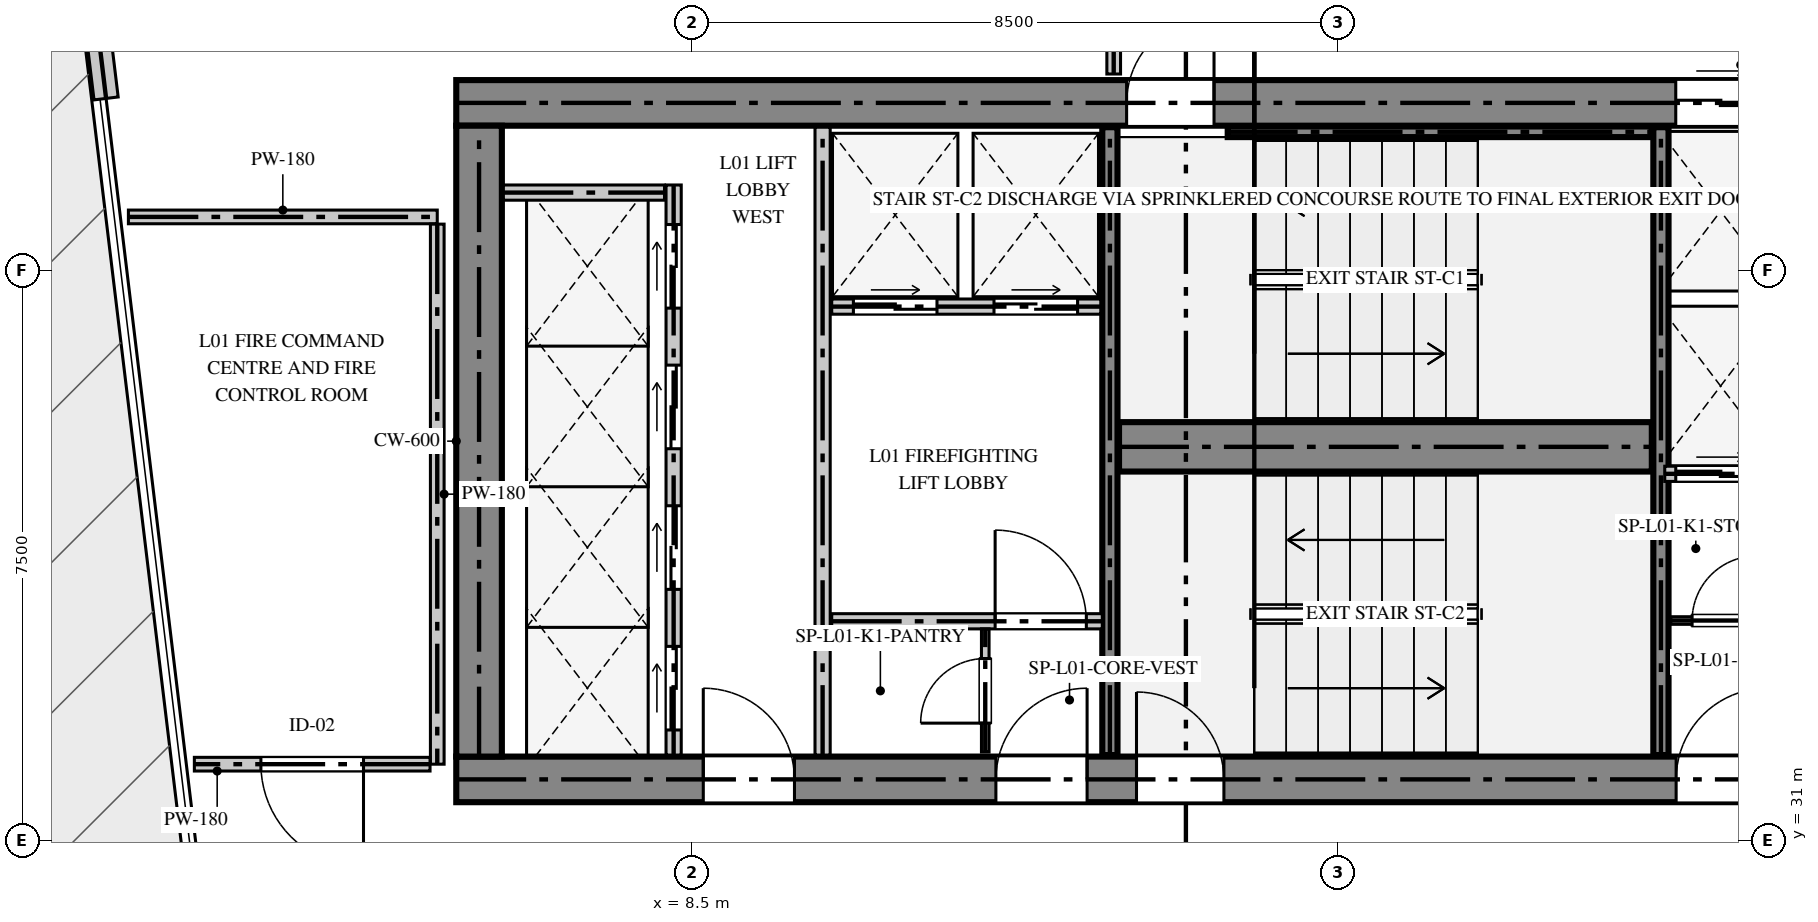
"""IFC4 building model, lengths in metres.
Left out: names, types, materials, properties, quantities, classifications, styles, units other than length and angle.
Written with IfcOpenShell. Run it as: python <this file> out.ifc"""

import sys

from ifc_helpers import new_model, si_unit, direction, frame, frame_2d, origin, place, context, subcontext, project, spatial, rectangle, extrude, element, fill, save


model = new_model("IFC4")
c1 = context("Model", 3, precision=1e-05, world=origin(), true_north=direction((0.0, 1.0)))
c2 = subcontext(c1, "Body", "Model", "MODEL_VIEW")
j1 = project(units=[si_unit("LENGTHUNIT", "METRE"), si_unit("PLANEANGLEUNIT", "RADIAN")], contexts=[c1])
p1 = place(None, origin())
s1 = spatial("IfcSite", under=j1, at=p1, CompositionType="ELEMENT")
p2 = place(p1, origin())
s2 = spatial("IfcBuilding", under=s1, at=p2, CompositionType="ELEMENT")
p3 = place(p2, origin())
s3 = spatial("IfcBuildingStorey", under=s2, at=p3, CompositionType="ELEMENT", Elevation=0.0)
p4 = place(p3, frame((5.4, 40.7, 0.0), z_axis=(0.0, 0.0, 1.0), x_axis=(1.0, 0.0, 0.0)))
e1 = element("IfcWall", 1, at=p4, inside=s3, PredefinedType="SHEAR", context=c2, shape_type="SweptSolid", body=[
    extrude(rectangle(XDim=18.05, YDim=0.6, at=frame_2d((9.025, 0.0))), origin(), (0.0, 0.0, 1.0), 5.4),
])
p5 = place(p4, frame((8.82, 0.0, 0.0)))
e2 = element("IfcOpeningElement", 2, at=p5, cuts=e1, PredefinedType="OPENING", context=c2, shape_type="SweptSolid", body=[
    extrude(rectangle(XDim=1.15, YDim=2.2, at=frame_2d((0.575, 1.1))), frame((0.0, 0.31, 0.0), z_axis=(0.0, -1.0, 0.0), x_axis=(1.0, 0.0, 0.0)), (0.0, 0.0, 1.0), 0.62),
])
p6 = place(p4, frame((16.045, 0.0, 0.0)))
e3 = element("IfcOpeningElement", 3, at=p6, cuts=e1, PredefinedType="OPENING", context=c2, shape_type="SweptSolid", body=[
    extrude(rectangle(XDim=1.18, YDim=2.25, at=frame_2d((0.59, 1.125))), frame((0.0, 0.31, 0.0), z_axis=(0.0, -1.0, 0.0), x_axis=(1.0, 0.0, 0.0)), (0.0, 0.0, 1.0), 0.62),
])
p7 = place(p3, frame((5.4, 31.8, 0.0), z_axis=(0.0, 0.0, 1.0), x_axis=(1.0, 0.0, 0.0)))
e4 = element("IfcWall", 4, at=p7, inside=s3, PredefinedType="SHEAR", context=c2, shape_type="SweptSolid", body=[
    extrude(rectangle(XDim=18.05, YDim=0.6, at=frame_2d((9.025, 0.0))), origin(), (0.0, 0.0, 1.0), 5.4),
])
p8 = place(p7, frame((3.25, 0.0, 0.0)))
e5 = element("IfcOpeningElement", 5, at=p8, cuts=e4, PredefinedType="OPENING", context=c2, shape_type="SweptSolid", body=[
    extrude(rectangle(XDim=1.2, YDim=2.2, at=frame_2d((0.6, 1.1))), frame((0.0, 0.31, 0.0), z_axis=(0.0, -1.0, 0.0), x_axis=(1.0, 0.0, 0.0)), (0.0, 0.0, 1.0), 0.62),
])
p9 = place(p7, frame((7.1, 0.0, 0.0)))
e6 = element("IfcOpeningElement", 6, at=p9, cuts=e4, PredefinedType="OPENING", context=c2, shape_type="SweptSolid", body=[
    extrude(rectangle(XDim=1.2, YDim=2.2, at=frame_2d((0.6, 1.1))), frame((0.0, 0.31, 0.0), z_axis=(0.0, -1.0, 0.0), x_axis=(1.0, 0.0, 0.0)), (0.0, 0.0, 1.0), 0.62),
])
p10 = place(p7, frame((8.95, 0.0, 0.0)))
e7 = element("IfcOpeningElement", 7, at=p10, cuts=e4, PredefinedType="OPENING", context=c2, shape_type="SweptSolid", body=[
    extrude(rectangle(XDim=1.15, YDim=2.2, at=frame_2d((0.575, 1.1))), frame((0.0, 0.31, 0.0), z_axis=(0.0, -1.0, 0.0), x_axis=(1.0, 0.0, 0.0)), (0.0, 0.0, 1.0), 0.62),
])
p11 = place(p7, frame((16.05, 0.0, 0.0)))
e8 = element("IfcOpeningElement", 8, at=p11, cuts=e4, PredefinedType="OPENING", context=c2, shape_type="SweptSolid", body=[
    extrude(rectangle(XDim=1.2, YDim=2.2, at=frame_2d((0.6, 1.1))), frame((0.0, 0.31, 0.0), z_axis=(0.0, -1.0, 0.0), x_axis=(1.0, 0.0, 0.0)), (0.0, 0.0, 1.0), 0.62),
])
p12 = place(p3, frame((5.7, 32.1, 0.0), z_axis=(0.0, 0.0, 1.0), x_axis=(0.0, 1.0, 0.0)))
e9 = element("IfcWall", 9, at=p12, inside=s3, PredefinedType="SHEAR", context=c2, shape_type="SweptSolid", body=[
    extrude(rectangle(XDim=8.3, YDim=0.6, at=frame_2d((4.15, 0.0))), origin(), (0.0, 0.0, 1.0), 5.4),
])
p13 = place(p3, frame((14.0, 32.12, 0.0), z_axis=(0.0, 0.0, 1.0), x_axis=(0.0, 1.0, 0.0)))
e10 = element("IfcWall", 10, at=p13, inside=s3, PredefinedType="SHEAR", context=c2, shape_type="SweptSolid", body=[
    extrude(rectangle(XDim=8.26, YDim=0.2, at=frame_2d((4.13, 0.0))), origin(), (0.0, 0.0, 1.0), 5.4),
])
p14 = place(p3, frame((14.12, 36.175, 0.0), z_axis=(0.0, 0.0, 1.0), x_axis=(1.0, 0.0, 0.0)))
e11 = element("IfcWall", 11, at=p14, inside=s3, PredefinedType="SHEAR", context=c2, shape_type="SweptSolid", body=[
    extrude(rectangle(XDim=7.01, YDim=0.65, at=frame_2d((3.505, 0.0))), origin(), (0.0, 0.0, 1.0), 5.4),
])
p15 = place(p3, frame((21.25, 32.12, 0.0), z_axis=(0.0, 0.0, 1.0), x_axis=(0.0, 1.0, 0.0)))
e12 = element("IfcWall", 12, at=p15, inside=s3, PredefinedType="SHEAR", context=c2, shape_type="SweptSolid", body=[
    extrude(rectangle(XDim=8.26, YDim=0.2, at=frame_2d((4.13, 0.0))), origin(), (0.0, 0.0, 1.0), 5.4),
])
p16 = place(p3, frame((15.55, 40.32, 0.0), z_axis=(0.0, 0.0, 1.0), x_axis=(1.0, 0.0, 0.0)))
e13 = element("IfcWall", 13, at=p16, inside=s3, PredefinedType="SHEAR", context=c2, shape_type="SweptSolid", body=[
    extrude(rectangle(XDim=5.58, YDim=0.14, at=frame_2d((2.79, 0.0))), origin(), (0.0, 0.0, 1.0), 5.4),
])
p17 = place(p3, frame((0.793, 40.759, 0.0), z_axis=(0.0, 0.0, 1.0), x_axis=(-0.119630264411, 0.992818513041, 0.0)))
e14 = element("IfcWall", 14, at=p17, inside=s3, PredefinedType="STANDARD", context=c2, shape_type="SweptSolid", body=[
    extrude(rectangle(XDim=2.6, YDim=0.32, at=frame_2d((1.3, 0.0))), origin(), (0.0, 0.0, 1.0), 5.08),
])
p18 = place(p3, frame((8.26, 32.12, 0.0), z_axis=(0.0, 0.0, 1.0), x_axis=(0.0, 1.0, 0.0)))
e15 = element("IfcWall", 15, at=p18, inside=s3, PredefinedType="PARTITIONING", context=c2, shape_type="SweptSolid", body=[
    extrude(rectangle(XDim=7.5, YDim=0.2, at=frame_2d((3.75, 0.0))), origin(), (0.0, 0.0, 1.0), 5.08),
])
p19 = place(p18, frame((0.33, 0.0, 0.0)))
e16 = element("IfcOpeningElement", 16, at=p19, cuts=e15, PredefinedType="OPENING", context=c2, shape_type="SweptSolid", body=[
    extrude(rectangle(XDim=1.1, YDim=2.2, at=frame_2d((0.55, 1.1))), frame((0.0, 0.11, 0.0), z_axis=(0.0, -1.0, 0.0), x_axis=(1.0, 0.0, 0.0)), (0.0, 0.0, 1.0), 0.22),
])
p20 = place(p18, frame((2.18, 0.0, 0.0)))
e17 = element("IfcOpeningElement", 17, at=p20, cuts=e15, PredefinedType="OPENING", context=c2, shape_type="SweptSolid", body=[
    extrude(rectangle(XDim=1.1, YDim=2.2, at=frame_2d((0.55, 1.1))), frame((0.0, 0.11, 0.0), z_axis=(0.0, -1.0, 0.0), x_axis=(1.0, 0.0, 0.0)), (0.0, 0.0, 1.0), 0.22),
])
p21 = place(p18, frame((4.03, 0.0, 0.0)))
e18 = element("IfcOpeningElement", 18, at=p21, cuts=e15, PredefinedType="OPENING", context=c2, shape_type="SweptSolid", body=[
    extrude(rectangle(XDim=1.1, YDim=2.2, at=frame_2d((0.55, 1.1))), frame((0.0, 0.11, 0.0), z_axis=(0.0, -1.0, 0.0), x_axis=(1.0, 0.0, 0.0)), (0.0, 0.0, 1.0), 0.22),
])
p22 = place(p18, frame((5.88, 0.0, 0.0)))
e19 = element("IfcOpeningElement", 19, at=p22, cuts=e15, PredefinedType="OPENING", context=c2, shape_type="SweptSolid", body=[
    extrude(rectangle(XDim=1.1, YDim=2.2, at=frame_2d((0.55, 1.1))), frame((0.0, 0.11, 0.0), z_axis=(0.0, -1.0, 0.0), x_axis=(1.0, 0.0, 0.0)), (0.0, 0.0, 1.0), 0.22),
])
p23 = place(p3, frame((6.02, 39.52, 0.0), z_axis=(0.0, 0.0, 1.0), x_axis=(1.0, 0.0, 0.0)))
e20 = element("IfcWall", 20, at=p23, inside=s3, PredefinedType="PARTITIONING", context=c2, shape_type="SweptSolid", body=[
    extrude(rectangle(XDim=2.12, YDim=0.2, at=frame_2d((1.06, 0.0))), origin(), (0.0, 0.0, 1.0), 5.08),
])
p24 = place(p3, frame((10.22, 32.12, 0.0), z_axis=(0.0, 0.0, 1.0), x_axis=(0.0, 1.0, 0.0)))
e21 = element("IfcWall", 21, at=p24, inside=s3, PredefinedType="PARTITIONING", context=c2, shape_type="SweptSolid", body=[
    extrude(rectangle(XDim=8.26, YDim=0.2, at=frame_2d((4.13, 0.0))), origin(), (0.0, 0.0, 1.0), 5.08),
])
p25 = place(p3, frame((10.34, 38.02, 0.0), z_axis=(0.0, 0.0, 1.0), x_axis=(1.0, 0.0, 0.0)))
e22 = element("IfcWall", 22, at=p25, inside=s3, PredefinedType="PARTITIONING", context=c2, shape_type="SweptSolid", body=[
    extrude(rectangle(XDim=3.54, YDim=0.2, at=frame_2d((1.77, 0.0))), origin(), (0.0, 0.0, 1.0), 5.08),
])
p26 = place(p25, frame((0.285, 0.0, 0.0)))
e23 = element("IfcOpeningElement", 23, at=p26, cuts=e22, PredefinedType="OPENING", context=c2, shape_type="SweptSolid", body=[
    extrude(rectangle(XDim=1.1, YDim=2.2, at=frame_2d((0.55, 1.1))), frame((0.0, 0.11, 0.0), z_axis=(0.0, -1.0, 0.0), x_axis=(1.0, 0.0, 0.0)), (0.0, 0.0, 1.0), 0.22),
])
p27 = place(p25, frame((2.135, 0.0, 0.0)))
e24 = element("IfcOpeningElement", 24, at=p27, cuts=e22, PredefinedType="OPENING", context=c2, shape_type="SweptSolid", body=[
    extrude(rectangle(XDim=1.1, YDim=2.2, at=frame_2d((0.55, 1.1))), frame((0.0, 0.11, 0.0), z_axis=(0.0, -1.0, 0.0), x_axis=(1.0, 0.0, 0.0)), (0.0, 0.0, 1.0), 0.22),
])
p28 = place(p3, frame((10.34, 33.88, 0.0), z_axis=(0.0, 0.0, 1.0), x_axis=(1.0, 0.0, 0.0)))
e25 = element("IfcWall", 25, at=p28, inside=s3, PredefinedType="PARTITIONING", context=c2, shape_type="SweptSolid", body=[
    extrude(rectangle(XDim=3.56, YDim=0.2, at=frame_2d((1.78, 0.0))), origin(), (0.0, 0.0, 1.0), 5.08),
])
p29 = place(p28, frame((2.15, 0.0, 0.0)))
e26 = element("IfcOpeningElement", 26, at=p29, cuts=e25, PredefinedType="OPENING", context=c2, shape_type="SweptSolid", body=[
    extrude(rectangle(XDim=1.2, YDim=2.2, at=frame_2d((0.6, 1.1))), frame((0.0, 0.11, 0.0), z_axis=(0.0, -1.0, 0.0), x_axis=(1.0, 0.0, 0.0)), (0.0, 0.0, 1.0), 0.22),
])
p30 = place(p3, frame((12.36, 32.16, 0.0), z_axis=(0.0, 0.0, 1.0), x_axis=(0.0, 1.0, 0.0)))
e27 = element("IfcWall", 27, at=p30, inside=s3, PredefinedType="PARTITIONING", context=c2, shape_type="SweptSolid", body=[
    extrude(rectangle(XDim=1.62, YDim=0.1, at=frame_2d((0.81, 0.0))), origin(), (0.0, 0.0, 1.0), 5.08),
])
p31 = place(p30, frame((0.38, 0.0, 0.0)))
e28 = element("IfcOpeningElement", 28, at=p31, cuts=e27, PredefinedType="OPENING", context=c2, shape_type="SweptSolid", body=[
    extrude(rectangle(XDim=0.85, YDim=2.1, at=frame_2d((0.425, 1.05))), frame((0.0, 0.06, 0.0), z_axis=(0.0, -1.0, 0.0), x_axis=(1.0, 0.0, 0.0)), (0.0, 0.0, 1.0), 0.12),
])
p32 = place(p3, frame((21.38, 33.89, 0.0), z_axis=(0.0, 0.0, 1.0), x_axis=(1.0, 0.0, 0.0)))
e29 = element("IfcWall", 29, at=p32, inside=s3, PredefinedType="PARTITIONING", context=c2, shape_type="SweptSolid", body=[
    extrude(rectangle(XDim=1.42, YDim=0.1, at=frame_2d((0.71, 0.0))), origin(), (0.0, 0.0, 1.0), 5.08),
])
p33 = place(p32, frame((0.28, 0.0, 0.0)))
e30 = element("IfcOpeningElement", 30, at=p33, cuts=e29, PredefinedType="OPENING", context=c2, shape_type="SweptSolid", body=[
    extrude(rectangle(XDim=0.85, YDim=2.1, at=frame_2d((0.425, 1.05))), frame((0.0, 0.06, 0.0), z_axis=(0.0, -1.0, 0.0), x_axis=(1.0, 0.0, 0.0)), (0.0, 0.0, 1.0), 0.12),
])
p34 = place(p3, frame((21.3, 35.82, 0.0), z_axis=(0.0, 0.0, 1.0), x_axis=(1.0, 0.0, 0.0)))
e31 = element("IfcWall", 31, at=p34, inside=s3, PredefinedType="PARTITIONING", context=c2, shape_type="SweptSolid", body=[
    extrude(rectangle(XDim=1.5, YDim=0.2, at=frame_2d((0.75, 0.0))), origin(), (0.0, 0.0, 1.0), 5.08),
])
p35 = place(p34, frame((0.145, 0.0, 0.0)))
e32 = element("IfcOpeningElement", 32, at=p35, cuts=e31, PredefinedType="OPENING", context=c2, shape_type="SweptSolid", body=[
    extrude(rectangle(XDim=1.18, YDim=2.25, at=frame_2d((0.59, 1.125))), frame((0.0, 0.11, 0.0), z_axis=(0.0, -1.0, 0.0), x_axis=(1.0, 0.0, 0.0)), (0.0, 0.0, 1.0), 0.22),
])
p36 = place(p3, frame((14.05, 41.08, 0.0), z_axis=(0.0, 0.0, 1.0), x_axis=(0.0, 1.0, 0.0)))
e33 = element("IfcWall", 33, at=p36, inside=s3, PredefinedType="PARTITIONING", context=c2, shape_type="SweptSolid", body=[
    extrude(rectangle(XDim=4.595, YDim=0.18, at=frame_2d((2.297, 0.0))), origin(), (0.0, 0.0, 1.0), 5.08),
])
p37 = place(p3, frame((1.086, 39.2, 0.0), z_axis=(0.0, 0.0, 1.0), x_axis=(1.0, 0.0, 0.0)))
e34 = element("IfcWall", 34, at=p37, inside=s3, PredefinedType="PARTITIONING", context=c2, shape_type="SweptSolid", body=[
    extrude(rectangle(XDim=4.063, YDim=0.18, at=frame_2d((2.032, 0.0))), origin(), (0.0, 0.0, 1.0), 5.08),
])
p38 = place(p3, frame((5.15, 39.105, 0.0), z_axis=(0.0, 0.0, 1.0), x_axis=(0.0, -1.0, 0.0)))
e35 = element("IfcWall", 35, at=p38, inside=s3, PredefinedType="PARTITIONING", context=c2, shape_type="SweptSolid", body=[
    extrude(rectangle(XDim=7.105, YDim=0.18, at=frame_2d((3.552, 0.0))), origin(), (0.0, 0.0, 1.0), 5.08),
])
p39 = place(p3, frame((5.055, 32.0, 0.0), z_axis=(0.0, 0.0, 1.0), x_axis=(-1.0, 0.0, 0.0)))
e36 = element("IfcWall", 36, at=p39, inside=s3, PredefinedType="PARTITIONING", context=c2, shape_type="SweptSolid", body=[
    extrude(rectangle(XDim=3.101, YDim=0.18, at=frame_2d((1.55, 0.0))), origin(), (0.0, 0.0, 1.0), 5.08),
])
p40 = place(p39, frame((0.875, 0.0, 0.0)))
e37 = element("IfcOpeningElement", 37, at=p40, cuts=e36, PredefinedType="OPENING", context=c2, shape_type="SweptSolid", body=[
    extrude(rectangle(XDim=1.35, YDim=2.2, at=frame_2d((0.675, 1.1))), frame((0.0, 0.1, 0.0), z_axis=(0.0, -1.0, 0.0), x_axis=(1.0, 0.0, 0.0)), (0.0, 0.0, 1.0), 0.2),
])
p41 = place(p8, origin())
e38 = element("IfcDoor", 38, at=p41, inside=s3, OperationType="SINGLE_SWING_LEFT", PredefinedType="DOOR", context=c2, shape_type="SweptSolid", body=[
    extrude(rectangle(XDim=1.2, YDim=2.2, at=frame_2d((0.6, 1.1))), frame((0.0, 0.025, 0.0), z_axis=(0.0, -1.0, 0.0), x_axis=(1.0, 0.0, 0.0)), (0.0, 0.0, 1.0), 0.05),
])
fill(e5, e38)
p42 = place(p9, origin())
e39 = element("IfcDoor", 39, at=p42, inside=s3, OperationType="SINGLE_SWING_RIGHT", PredefinedType="DOOR", context=c2, shape_type="SweptSolid", body=[
    extrude(rectangle(XDim=1.2, YDim=2.2, at=frame_2d((0.6, 1.1))), frame((0.0, 0.025, 0.0), z_axis=(0.0, -1.0, 0.0), x_axis=(1.0, 0.0, 0.0)), (0.0, 0.0, 1.0), 0.05),
])
fill(e6, e39)
p43 = place(p10, origin())
e40 = element("IfcDoor", 40, at=p43, inside=s3, OperationType="SINGLE_SWING_LEFT", PredefinedType="DOOR", context=c2, shape_type="SweptSolid", body=[
    extrude(rectangle(XDim=1.15, YDim=2.2, at=frame_2d((0.575, 1.1))), frame((0.0, 0.025, 0.0), z_axis=(0.0, -1.0, 0.0), x_axis=(1.0, 0.0, 0.0)), (0.0, 0.0, 1.0), 0.05),
])
fill(e7, e40)
p44 = place(p11, origin())
e41 = element("IfcDoor", 41, at=p44, inside=s3, OperationType="SINGLE_SWING_RIGHT", PredefinedType="DOOR", context=c2, shape_type="SweptSolid", body=[
    extrude(rectangle(XDim=1.2, YDim=2.2, at=frame_2d((0.6, 1.1))), frame((0.0, 0.025, 0.0), z_axis=(0.0, -1.0, 0.0), x_axis=(1.0, 0.0, 0.0)), (0.0, 0.0, 1.0), 0.05),
])
fill(e8, e41)
p45 = place(p29, origin())
e42 = element("IfcDoor", 42, at=p45, inside=s3, OperationType="SINGLE_SWING_LEFT", PredefinedType="DOOR", context=c2, shape_type="SweptSolid", body=[
    extrude(rectangle(XDim=1.2, YDim=2.2, at=frame_2d((0.6, 1.1))), frame((0.0, 0.025, 0.0), z_axis=(0.0, -1.0, 0.0), x_axis=(1.0, 0.0, 0.0)), (0.0, 0.0, 1.0), 0.05),
])
fill(e26, e42)
p46 = place(p31, origin())
e43 = element("IfcDoor", 43, at=p46, inside=s3, OperationType="SINGLE_SWING_LEFT", PredefinedType="DOOR", context=c2, shape_type="SweptSolid", body=[
    extrude(rectangle(XDim=0.85, YDim=2.1, at=frame_2d((0.425, 1.05))), frame((0.0, 0.025, 0.0), z_axis=(0.0, -1.0, 0.0), x_axis=(1.0, 0.0, 0.0)), (0.0, 0.0, 1.0), 0.05),
])
fill(e28, e43)
p47 = place(p33, origin())
e44 = element("IfcDoor", 44, at=p47, inside=s3, OperationType="SINGLE_SWING_RIGHT", PredefinedType="DOOR", context=c2, shape_type="SweptSolid", body=[
    extrude(rectangle(XDim=0.85, YDim=2.1, at=frame_2d((0.425, 1.05))), frame((0.0, 0.025, 0.0), z_axis=(0.0, -1.0, 0.0), x_axis=(1.0, 0.0, 0.0)), (0.0, 0.0, 1.0), 0.05),
])
fill(e30, e44)
p48 = place(p5, origin())
e45 = element("IfcDoor", 45, at=p48, inside=s3, OperationType="SINGLE_SWING_RIGHT", PredefinedType="DOOR", context=c2, shape_type="SweptSolid", body=[
    extrude(rectangle(XDim=1.15, YDim=2.2, at=frame_2d((0.575, 1.1))), frame((0.0, 0.025, 0.0), z_axis=(0.0, -1.0, 0.0), x_axis=(1.0, 0.0, 0.0)), (0.0, 0.0, 1.0), 0.05),
])
fill(e2, e45)
p49 = place(p19, origin())
e46 = element("IfcDoor", 46, at=p49, inside=s3, OperationType="DOUBLE_DOOR_SLIDING", PredefinedType="DOOR", context=c2, shape_type="SweptSolid", body=[
    extrude(rectangle(XDim=1.1, YDim=2.2, at=frame_2d((0.55, 1.1))), frame((0.0, 0.025, 0.0), z_axis=(0.0, -1.0, 0.0), x_axis=(1.0, 0.0, 0.0)), (0.0, 0.0, 1.0), 0.05),
])
fill(e16, e46)
p50 = place(p20, origin())
e47 = element("IfcDoor", 47, at=p50, inside=s3, OperationType="DOUBLE_DOOR_SLIDING", PredefinedType="DOOR", context=c2, shape_type="SweptSolid", body=[
    extrude(rectangle(XDim=1.1, YDim=2.2, at=frame_2d((0.55, 1.1))), frame((0.0, 0.025, 0.0), z_axis=(0.0, -1.0, 0.0), x_axis=(1.0, 0.0, 0.0)), (0.0, 0.0, 1.0), 0.05),
])
fill(e17, e47)
p51 = place(p21, origin())
e48 = element("IfcDoor", 48, at=p51, inside=s3, OperationType="DOUBLE_DOOR_SLIDING", PredefinedType="DOOR", context=c2, shape_type="SweptSolid", body=[
    extrude(rectangle(XDim=1.1, YDim=2.2, at=frame_2d((0.55, 1.1))), frame((0.0, 0.025, 0.0), z_axis=(0.0, -1.0, 0.0), x_axis=(1.0, 0.0, 0.0)), (0.0, 0.0, 1.0), 0.05),
])
fill(e18, e48)
p52 = place(p22, origin())
e49 = element("IfcDoor", 49, at=p52, inside=s3, OperationType="DOUBLE_DOOR_SLIDING", PredefinedType="DOOR", context=c2, shape_type="SweptSolid", body=[
    extrude(rectangle(XDim=1.1, YDim=2.2, at=frame_2d((0.55, 1.1))), frame((0.0, 0.025, 0.0), z_axis=(0.0, -1.0, 0.0), x_axis=(1.0, 0.0, 0.0)), (0.0, 0.0, 1.0), 0.05),
])
fill(e19, e49)
p53 = place(p26, origin())
e50 = element("IfcDoor", 50, at=p53, inside=s3, OperationType="DOUBLE_DOOR_SLIDING", PredefinedType="DOOR", context=c2, shape_type="SweptSolid", body=[
    extrude(rectangle(XDim=1.1, YDim=2.2, at=frame_2d((0.55, 1.1))), frame((0.0, 0.025, 0.0), z_axis=(0.0, -1.0, 0.0), x_axis=(1.0, 0.0, 0.0)), (0.0, 0.0, 1.0), 0.05),
])
fill(e23, e50)
p54 = place(p27, origin())
e51 = element("IfcDoor", 51, at=p54, inside=s3, OperationType="DOUBLE_DOOR_SLIDING", PredefinedType="DOOR", context=c2, shape_type="SweptSolid", body=[
    extrude(rectangle(XDim=1.1, YDim=2.2, at=frame_2d((0.55, 1.1))), frame((0.0, 0.025, 0.0), z_axis=(0.0, -1.0, 0.0), x_axis=(1.0, 0.0, 0.0)), (0.0, 0.0, 1.0), 0.05),
])
fill(e24, e51)
p55 = place(p6, origin())
e52 = element("IfcDoor", 52, at=p55, inside=s3, OperationType="DOUBLE_DOOR_SLIDING", PredefinedType="DOOR", context=c2, shape_type="SweptSolid", body=[
    extrude(rectangle(XDim=1.18, YDim=2.25, at=frame_2d((0.59, 1.125))), frame((0.0, 0.025, 0.0), z_axis=(0.0, -1.0, 0.0), x_axis=(1.0, 0.0, 0.0)), (0.0, 0.0, 1.0), 0.05),
])
fill(e3, e52)
p56 = place(p35, origin())
e53 = element("IfcDoor", 53, at=p56, inside=s3, OperationType="DOUBLE_DOOR_SLIDING", PredefinedType="DOOR", context=c2, shape_type="SweptSolid", body=[
    extrude(rectangle(XDim=1.18, YDim=2.25, at=frame_2d((0.59, 1.125))), frame((0.0, 0.025, 0.0), z_axis=(0.0, -1.0, 0.0), x_axis=(1.0, 0.0, 0.0)), (0.0, 0.0, 1.0), 0.05),
])
fill(e32, e53)
p57 = place(p40, origin())
e54 = element("IfcDoor", 54, at=p57, inside=s3, OperationType="SINGLE_SWING_LEFT", PredefinedType="DOOR", context=c2, shape_type="SweptSolid", body=[
    extrude(rectangle(XDim=1.35, YDim=2.2, at=frame_2d((0.675, 1.1))), frame((0.0, 0.025, 0.0), z_axis=(0.0, -1.0, 0.0), x_axis=(1.0, 0.0, 0.0)), (0.0, 0.0, 1.0), 0.05),
])
fill(e37, e54)
save(model, sys.argv[1])
